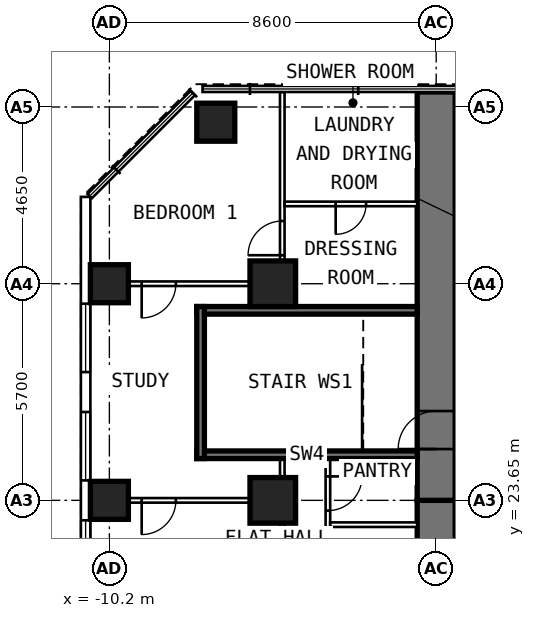
"""IFC4 building model, lengths in metres.
Left out: names, types, materials, properties, quantities, classifications, styles, units other than length and angle.
Written with IfcOpenShell. Run it as: python <this file> out.ifc"""

import sys

from ifc_helpers import new_model, si_unit, direction, frame, frame_2d, origin, origin_2d, place, context, subcontext, project, spatial, rectangle, extrude, element, fill, save


model = new_model("IFC4")
c1 = context("Model", 3, precision=1e-05, world=origin(), true_north=direction((0.0, 1.0)))
c2 = subcontext(c1, "Body", "Model", "MODEL_VIEW")
j1 = project(units=[si_unit("LENGTHUNIT", "METRE"), si_unit("PLANEANGLEUNIT", "RADIAN")], contexts=[c1])
p1 = place(None, origin())
s1 = spatial("IfcSite", under=j1, at=p1, CompositionType="ELEMENT")
p2 = place(p1, origin())
s2 = spatial("IfcBuilding", under=s1, at=p2, CompositionType="ELEMENT")
p3 = place(p2, frame((0.0, 0.0, 109.6)))
s3 = spatial("IfcBuildingStorey", under=s2, at=p3, CompositionType="ELEMENT", Elevation=109.6)
for number, where, z_axis, x_axis in (
    (1, (-10.2, 23.65, 0.0), (0.0, 0.0, 1.0), (0.0, 1.0, 0.0)),
    (2, (-10.2, 29.35, 0.0), (0.0, 0.0, 1.0), (0.0, 1.0, 0.0)),
    (3, (-7.4, 33.6, 0.0), (0.0, 0.0, 1.0), (0.0, 1.0, 0.0)),
):
    element("IfcColumn", number, at=place(p3, frame(where, z_axis=z_axis, x_axis=x_axis)), inside=s3, PredefinedType="COLUMN", context=c2, shape_type="SweptSolid", body=[
        extrude(rectangle(XDim=1.0, YDim=1.0, at=origin_2d()), origin(), (0.0, 0.0, 1.0), 3.6),
    ])
for number, where, z_axis, x_axis in (
    (4, (-5.9, 23.65, 0.0), (0.0, 0.0, 1.0), (0.0, 1.0, 0.0)),
    (5, (-5.9, 29.35, 0.0), (0.0, 0.0, 1.0), (0.0, 1.0, 0.0)),
):
    element("IfcColumn", number, at=place(p3, frame(where, z_axis=z_axis, x_axis=x_axis)), inside=s3, PredefinedType="COLUMN", context=c2, shape_type="SweptSolid", body=[
        extrude(rectangle(XDim=1.2, YDim=1.2, at=origin_2d()), origin(), (0.0, 0.0, 1.0), 3.6),
    ])
p4 = place(p3, frame((-1.6, 17.95, 0.0), z_axis=(0.0, 0.0, 1.0), x_axis=(0.0, 1.0, 0.0)))
e6 = element("IfcWall", 6, at=p4, inside=s3, PredefinedType="SHEAR", context=c2, shape_type="SweptSolid", body=[
    extrude(rectangle(XDim=5.7, YDim=1.0, at=frame_2d((2.85, 0.0))), origin(), (0.0, 0.0, 1.0), 3.6),
])
p5 = place(p4, frame((0.9, 0.0, 0.0)))
e7 = element("IfcOpeningElement", 7, at=p5, cuts=e6, PredefinedType="OPENING", context=c2, shape_type="SweptSolid", body=[
    extrude(rectangle(XDim=1.0, YDim=2.1, at=frame_2d((0.5, 1.05))), frame((0.0, 0.512, 0.0), z_axis=(0.0, -1.0, 0.0), x_axis=(1.0, 0.0, 0.0)), (0.0, 0.0, 1.0), 1.024),
])
p6 = place(p3, frame((-1.6, 23.65, 0.0), z_axis=(0.0, 0.0, 1.0), x_axis=(0.0, 1.0, 0.0)))
e8 = element("IfcWall", 8, at=p6, inside=s3, PredefinedType="SHEAR", context=c2, shape_type="SweptSolid", body=[
    extrude(rectangle(XDim=10.745, YDim=1.0, at=frame_2d((5.373, 0.0))), origin(), (0.0, 0.0, 1.0), 3.6),
])
p7 = place(p6, frame((1.35, 0.0, 0.0)))
e9 = element("IfcOpeningElement", 9, at=p7, cuts=e8, PredefinedType="OPENING", context=c2, shape_type="SweptSolid", body=[
    extrude(rectangle(XDim=1.0, YDim=2.1, at=frame_2d((0.5, 1.05))), frame((0.0, 0.512, 0.0), z_axis=(0.0, -1.0, 0.0), x_axis=(1.0, 0.0, 0.0)), (0.0, 0.0, 1.0), 1.024),
])
p8 = place(p3, frame((-10.825, 6.148, 0.0), z_axis=(0.0, 0.0, 1.0), x_axis=(0.0, 1.0, 0.0)))
e10 = element("IfcWall", 10, at=p8, inside=s3, PredefinedType="SOLIDWALL", context=c2, shape_type="SweptSolid", body=[
    extrude(rectangle(XDim=25.487, YDim=0.25, at=frame_2d((12.744, 0.0))), origin(), (0.0, 0.0, 1.0), 3.3),
])
p9 = place(p8, frame((0.927, 0.0, 0.8)))
e11 = element("IfcOpeningElement", 11, at=p9, cuts=e10, PredefinedType="OPENING", context=c2, shape_type="SweptSolid", body=[
    extrude(rectangle(XDim=1.8, YDim=1.8, at=frame_2d((0.9, 0.9))), frame((0.0, 0.137, 0.0), z_axis=(0.0, -1.0, 0.0), x_axis=(1.0, 0.0, 0.0)), (0.0, 0.0, 1.0), 0.274),
])
p10 = place(p8, frame((3.777, 0.0, 0.8)))
e12 = element("IfcOpeningElement", 12, at=p10, cuts=e10, PredefinedType="OPENING", context=c2, shape_type="SweptSolid", body=[
    extrude(rectangle(XDim=1.8, YDim=1.8, at=frame_2d((0.9, 0.9))), frame((0.0, 0.137, 0.0), z_axis=(0.0, -1.0, 0.0), x_axis=(1.0, 0.0, 0.0)), (0.0, 0.0, 1.0), 0.274),
])
p11 = place(p8, frame((6.627, 0.0, 0.8)))
e13 = element("IfcOpeningElement", 13, at=p11, cuts=e10, PredefinedType="OPENING", context=c2, shape_type="SweptSolid", body=[
    extrude(rectangle(XDim=1.8, YDim=1.8, at=frame_2d((0.9, 0.9))), frame((0.0, 0.137, 0.0), z_axis=(0.0, -1.0, 0.0), x_axis=(1.0, 0.0, 0.0)), (0.0, 0.0, 1.0), 0.274),
])
p12 = place(p8, frame((9.477, 0.0, 0.8)))
e14 = element("IfcOpeningElement", 14, at=p12, cuts=e10, PredefinedType="OPENING", context=c2, shape_type="SweptSolid", body=[
    extrude(rectangle(XDim=1.8, YDim=1.8, at=frame_2d((0.9, 0.9))), frame((0.0, 0.137, 0.0), z_axis=(0.0, -1.0, 0.0), x_axis=(1.0, 0.0, 0.0)), (0.0, 0.0, 1.0), 0.274),
])
p13 = place(p8, frame((12.327, 0.0, 0.8)))
e15 = element("IfcOpeningElement", 15, at=p13, cuts=e10, PredefinedType="OPENING", context=c2, shape_type="SweptSolid", body=[
    extrude(rectangle(XDim=1.8, YDim=1.8, at=frame_2d((0.9, 0.9))), frame((0.0, 0.137, 0.0), z_axis=(0.0, -1.0, 0.0), x_axis=(1.0, 0.0, 0.0)), (0.0, 0.0, 1.0), 0.274),
])
p14 = place(p8, frame((15.177, 0.0, 0.8)))
e16 = element("IfcOpeningElement", 16, at=p14, cuts=e10, PredefinedType="OPENING", context=c2, shape_type="SweptSolid", body=[
    extrude(rectangle(XDim=1.8, YDim=1.8, at=frame_2d((0.9, 0.9))), frame((0.0, 0.137, 0.0), z_axis=(0.0, -1.0, 0.0), x_axis=(1.0, 0.0, 0.0)), (0.0, 0.0, 1.0), 0.274),
])
p15 = place(p8, frame((18.027, 0.0, 0.8)))
e17 = element("IfcOpeningElement", 17, at=p15, cuts=e10, PredefinedType="OPENING", context=c2, shape_type="SweptSolid", body=[
    extrude(rectangle(XDim=1.8, YDim=1.8, at=frame_2d((0.9, 0.9))), frame((0.0, 0.137, 0.0), z_axis=(0.0, -1.0, 0.0), x_axis=(1.0, 0.0, 0.0)), (0.0, 0.0, 1.0), 0.274),
])
p16 = place(p8, frame((20.877, 0.0, 0.8)))
e18 = element("IfcOpeningElement", 18, at=p16, cuts=e10, PredefinedType="OPENING", context=c2, shape_type="SweptSolid", body=[
    extrude(rectangle(XDim=1.8, YDim=1.8, at=frame_2d((0.9, 0.9))), frame((0.0, 0.137, 0.0), z_axis=(0.0, -1.0, 0.0), x_axis=(1.0, 0.0, 0.0)), (0.0, 0.0, 1.0), 0.274),
])
p17 = place(p3, frame((-4.45, 18.05, 0.0), z_axis=(0.0, 0.0, 1.0), x_axis=(0.0, 1.0, 0.0)))
e19 = element("IfcWall", 19, at=p17, inside=s3, PredefinedType="PARTITIONING", context=c2, shape_type="SweptSolid", body=[
    extrude(rectangle(XDim=6.7, YDim=0.12, at=frame_2d((3.35, 0.0))), origin(), (0.0, 0.0, 1.0), 3.3),
])
p18 = place(p17, frame((0.75, 0.0, 0.0)))
e20 = element("IfcOpeningElement", 20, at=p18, cuts=e19, PredefinedType="OPENING", context=c2, shape_type="SweptSolid", body=[
    extrude(rectangle(XDim=0.9, YDim=2.1, at=frame_2d((0.45, 1.05))), frame((0.0, 0.072, 0.0), z_axis=(0.0, -1.0, 0.0), x_axis=(1.0, 0.0, 0.0)), (0.0, 0.0, 1.0), 0.144),
])
p19 = place(p17, frame((3.33, 0.0, 0.0)))
e21 = element("IfcOpeningElement", 21, at=p19, cuts=e19, PredefinedType="OPENING", context=c2, shape_type="SweptSolid", body=[
    extrude(rectangle(XDim=0.8, YDim=2.1, at=frame_2d((0.4, 1.05))), frame((0.0, 0.072, 0.0), z_axis=(0.0, -1.0, 0.0), x_axis=(1.0, 0.0, 0.0)), (0.0, 0.0, 1.0), 0.144),
])
p20 = place(p17, frame((5.33, 0.0, 0.0)))
e22 = element("IfcOpeningElement", 22, at=p20, cuts=e19, PredefinedType="OPENING", context=c2, shape_type="SweptSolid", body=[
    extrude(rectangle(XDim=0.9, YDim=2.1, at=frame_2d((0.45, 1.05))), frame((0.0, 0.072, 0.0), z_axis=(0.0, -1.0, 0.0), x_axis=(1.0, 0.0, 0.0)), (0.0, 0.0, 1.0), 0.144),
])
p21 = place(p3, frame((-5.65, 18.05, 0.0), z_axis=(0.0, 0.0, 1.0), x_axis=(0.0, 1.0, 0.0)))
e23 = element("IfcWall", 23, at=p21, inside=s3, PredefinedType="PARTITIONING", context=c2, shape_type="SweptSolid", body=[
    extrude(rectangle(XDim=6.7, YDim=0.12, at=frame_2d((3.35, 0.0))), origin(), (0.0, 0.0, 1.0), 3.3),
])
p22 = place(p21, frame((2.3, 0.0, 0.0)))
e24 = element("IfcOpeningElement", 24, at=p22, cuts=e23, PredefinedType="OPENING", context=c2, shape_type="SweptSolid", body=[
    extrude(rectangle(XDim=0.9, YDim=2.1, at=frame_2d((0.45, 1.05))), frame((0.0, 0.072, 0.0), z_axis=(0.0, -1.0, 0.0), x_axis=(1.0, 0.0, 0.0)), (0.0, 0.0, 1.0), 0.144),
])
p23 = place(p3, frame((-2.1, 23.01, 0.0), z_axis=(0.0, 0.0, 1.0), x_axis=(-1.0, 0.0, 0.0)))
e25 = element("IfcWall", 25, at=p23, inside=s3, PredefinedType="PARTITIONING", context=c2, shape_type="SweptSolid", body=[
    extrude(rectangle(XDim=2.29, YDim=0.12, at=frame_2d((1.145, 0.0))), origin(), (0.0, 0.0, 1.0), 3.3),
])
p24 = place(p3, frame((-5.71, 23.65, 0.0), z_axis=(0.0, 0.0, 1.0), x_axis=(-1.0, 0.0, 0.0)))
e26 = element("IfcWall", 26, at=p24, inside=s3, PredefinedType="PARTITIONING", context=c2, shape_type="SweptSolid", body=[
    extrude(rectangle(XDim=4.99, YDim=0.12, at=frame_2d((2.495, 0.0))), origin(), (0.0, 0.0, 1.0), 3.3),
])
p25 = place(p24, frame((2.74, 0.0, 0.0)))
e27 = element("IfcOpeningElement", 27, at=p25, cuts=e26, PredefinedType="OPENING", context=c2, shape_type="SweptSolid", body=[
    extrude(rectangle(XDim=0.9, YDim=2.1, at=frame_2d((0.45, 1.05))), frame((0.0, 0.072, 0.0), z_axis=(0.0, -1.0, 0.0), x_axis=(1.0, 0.0, 0.0)), (0.0, 0.0, 1.0), 0.144),
])
p26 = place(p3, frame((-5.71, 29.35, 0.0), z_axis=(0.0, 0.0, 1.0), x_axis=(-1.0, 0.0, 0.0)))
e28 = element("IfcWall", 28, at=p26, inside=s3, PredefinedType="PARTITIONING", context=c2, shape_type="SweptSolid", body=[
    extrude(rectangle(XDim=4.99, YDim=0.12, at=frame_2d((2.495, 0.0))), origin(), (0.0, 0.0, 1.0), 2.3),
])
p27 = place(p26, frame((2.74, 0.0, 0.0)))
e29 = element("IfcOpeningElement", 29, at=p27, cuts=e28, PredefinedType="OPENING", context=c2, shape_type="SweptSolid", body=[
    extrude(rectangle(XDim=0.9, YDim=2.1, at=frame_2d((0.45, 1.05))), frame((0.0, 0.072, 0.0), z_axis=(0.0, -1.0, 0.0), x_axis=(1.0, 0.0, 0.0)), (0.0, 0.0, 1.0), 0.144),
])
p28 = place(p3, frame((-5.65, 28.95, 0.0), z_axis=(0.0, 0.0, 1.0), x_axis=(0.0, 1.0, 0.0)))
e30 = element("IfcWall", 30, at=p28, inside=s3, PredefinedType="PARTITIONING", context=c2, shape_type="SweptSolid", body=[
    extrude(rectangle(XDim=5.445, YDim=0.12, at=frame_2d((2.723, 0.0))), origin(), (0.0, 0.0, 1.0), 3.3),
])
p29 = place(p28, frame((1.15, 0.0, 0.0)))
e31 = element("IfcOpeningElement", 31, at=p29, cuts=e30, PredefinedType="OPENING", context=c2, shape_type="SweptSolid", body=[
    extrude(rectangle(XDim=0.9, YDim=2.1, at=frame_2d((0.45, 1.05))), frame((0.0, 0.072, 0.0), z_axis=(0.0, -1.0, 0.0), x_axis=(1.0, 0.0, 0.0)), (0.0, 0.0, 1.0), 0.144),
])
p30 = place(p3, frame((-2.1, 31.45, 0.0), z_axis=(0.0, 0.0, 1.0), x_axis=(-1.0, 0.0, 0.0)))
e32 = element("IfcWall", 32, at=p30, inside=s3, PredefinedType="PARTITIONING", context=c2, shape_type="SweptSolid", body=[
    extrude(rectangle(XDim=3.49, YDim=0.12, at=frame_2d((1.745, 0.0))), origin(), (0.0, 0.0, 1.0), 3.3),
])
p31 = place(p30, frame((1.345, 0.0, 0.0)))
e33 = element("IfcOpeningElement", 33, at=p31, cuts=e32, PredefinedType="OPENING", context=c2, shape_type="SweptSolid", body=[
    extrude(rectangle(XDim=0.8, YDim=2.1, at=frame_2d((0.4, 1.05))), frame((0.0, 0.072, 0.0), z_axis=(0.0, -1.0, 0.0), x_axis=(1.0, 0.0, 0.0)), (0.0, 0.0, 1.0), 0.144),
])
for number, where, z_axis, x_axis in (
    (34, (-2.1, 24.85, 0.0), (0.0, 0.0, 1.0), (-1.0, 0.0, 0.0)),
    (35, (-2.1, 28.65, 0.0), (0.0, 0.0, 1.0), (-1.0, 0.0, 0.0)),
):
    element("IfcWall", number, at=place(p3, frame(where, z_axis=z_axis, x_axis=x_axis)), inside=s3, PredefinedType="SHEAR", context=c2, shape_type="SweptSolid", body=[
        extrude(rectangle(XDim=5.8, YDim=0.2, at=frame_2d((2.9, 0.0))), origin(), (0.0, 0.0, 1.0), 3.28),
    ])
p32 = place(p3, frame((-7.8, 24.75, 0.0), z_axis=(0.0, 0.0, 1.0), x_axis=(0.0, 1.0, 0.0)))
e36 = element("IfcWall", 36, at=p32, inside=s3, PredefinedType="SHEAR", context=c2, shape_type="SweptSolid", body=[
    extrude(rectangle(XDim=4.0, YDim=0.2, at=frame_2d((2.0, 0.0))), origin(), (0.0, 0.0, 1.0), 3.28),
])
p33 = place(p14, origin())
e37 = element("IfcWindow", 37, at=p33, inside=s3, PartitioningType="SINGLE_PANEL", PredefinedType="WINDOW", context=c2, shape_type="SweptSolid", body=[
    extrude(rectangle(XDim=1.8, YDim=1.8, at=frame_2d((0.9, 0.9))), frame((0.0, 0.03, 0.0), z_axis=(0.0, -1.0, 0.0), x_axis=(1.0, 0.0, 0.0)), (0.0, 0.0, 1.0), 0.06),
])
fill(e16, e37)
p34 = place(p15, origin())
e38 = element("IfcWindow", 38, at=p34, inside=s3, PartitioningType="SINGLE_PANEL", PredefinedType="WINDOW", context=c2, shape_type="SweptSolid", body=[
    extrude(rectangle(XDim=1.8, YDim=1.8, at=frame_2d((0.9, 0.9))), frame((0.0, 0.03, 0.0), z_axis=(0.0, -1.0, 0.0), x_axis=(1.0, 0.0, 0.0)), (0.0, 0.0, 1.0), 0.06),
])
fill(e17, e38)
p35 = place(p16, origin())
e39 = element("IfcWindow", 39, at=p35, inside=s3, PartitioningType="SINGLE_PANEL", PredefinedType="WINDOW", context=c2, shape_type="SweptSolid", body=[
    extrude(rectangle(XDim=1.8, YDim=1.8, at=frame_2d((0.9, 0.9))), frame((0.0, 0.03, 0.0), z_axis=(0.0, -1.0, 0.0), x_axis=(1.0, 0.0, 0.0)), (0.0, 0.0, 1.0), 0.06),
])
fill(e18, e39)
p36 = place(p20, frame((0.9, 0.0, 0.0), z_axis=(0.0, 0.0, 1.0), x_axis=(-1.0, 0.0, 0.0)))
e40 = element("IfcDoor", 40, at=p36, inside=s3, OperationType="SINGLE_SWING_LEFT", PredefinedType="DOOR", context=c2, shape_type="SweptSolid", body=[
    extrude(rectangle(XDim=0.9, YDim=2.1, at=frame_2d((0.45, 1.05))), frame((0.0, 0.025, 0.0), z_axis=(0.0, -1.0, 0.0), x_axis=(1.0, 0.0, 0.0)), (0.0, 0.0, 1.0), 0.05),
])
fill(e22, e40)
p37 = place(p27, origin())
e41 = element("IfcDoor", 41, at=p37, inside=s3, OperationType="SINGLE_SWING_RIGHT", PredefinedType="DOOR", context=c2, shape_type="SweptSolid", body=[
    extrude(rectangle(XDim=0.9, YDim=2.1, at=frame_2d((0.45, 1.05))), frame((0.0, 0.025, 0.0), z_axis=(0.0, -1.0, 0.0), x_axis=(1.0, 0.0, 0.0)), (0.0, 0.0, 1.0), 0.05),
])
fill(e29, e41)
p38 = place(p29, origin())
e42 = element("IfcDoor", 42, at=p38, inside=s3, OperationType="SINGLE_SWING_LEFT", PredefinedType="DOOR", context=c2, shape_type="SweptSolid", body=[
    extrude(rectangle(XDim=0.9, YDim=2.1, at=frame_2d((0.45, 1.05))), frame((0.0, 0.025, 0.0), z_axis=(0.0, -1.0, 0.0), x_axis=(1.0, 0.0, 0.0)), (0.0, 0.0, 1.0), 0.05),
])
fill(e31, e42)
p39 = place(p31, origin())
e43 = element("IfcDoor", 43, at=p39, inside=s3, OperationType="SINGLE_SWING_RIGHT", PredefinedType="DOOR", context=c2, shape_type="SweptSolid", body=[
    extrude(rectangle(XDim=0.8, YDim=2.1, at=frame_2d((0.4, 1.05))), frame((0.0, 0.025, 0.0), z_axis=(0.0, -1.0, 0.0), x_axis=(1.0, 0.0, 0.0)), (0.0, 0.0, 1.0), 0.05),
])
fill(e33, e43)
p40 = place(p25, origin())
e44 = element("IfcDoor", 44, at=p40, inside=s3, OperationType="SINGLE_SWING_RIGHT", PredefinedType="DOOR", context=c2, shape_type="SweptSolid", body=[
    extrude(rectangle(XDim=0.9, YDim=2.1, at=frame_2d((0.45, 1.05))), frame((0.0, 0.025, 0.0), z_axis=(0.0, -1.0, 0.0), x_axis=(1.0, 0.0, 0.0)), (0.0, 0.0, 1.0), 0.05),
])
fill(e27, e44)
p41 = place(p7, origin())
e45 = element("IfcDoor", 45, at=p41, inside=s3, OperationType="SINGLE_SWING_LEFT", PredefinedType="DOOR", context=c2, shape_type="SweptSolid", body=[
    extrude(rectangle(XDim=1.0, YDim=2.1, at=frame_2d((0.5, 1.05))), frame((0.0, 0.25, 0.0), z_axis=(0.0, -1.0, 0.0), x_axis=(1.0, 0.0, 0.0)), (0.0, 0.0, 1.0), 0.5),
])
fill(e9, e45)
save(model, sys.argv[1])
